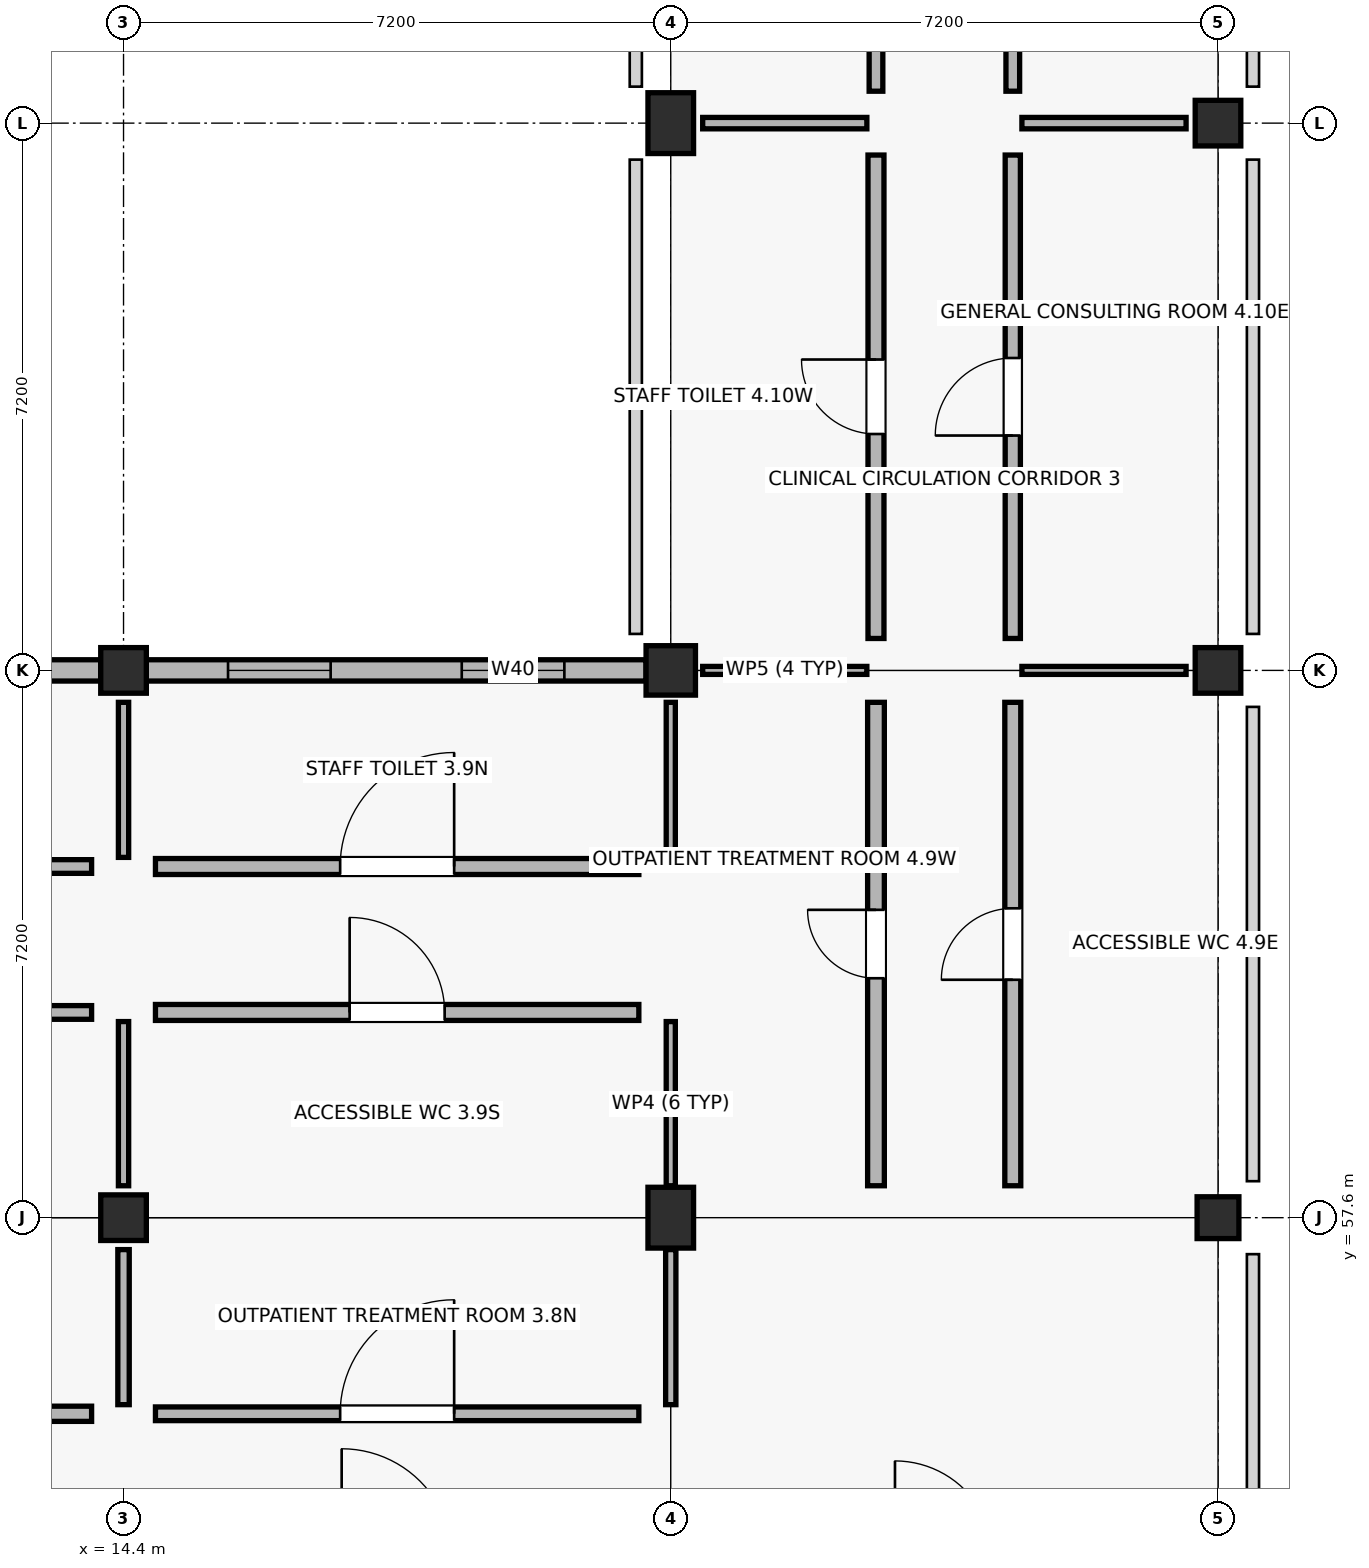
"""IFC4 building model, lengths in metres.
Left out: names, types, materials, properties, quantities, classifications, styles, units other than length and angle.
Written with IfcOpenShell. Run it as: python <this file> out.ifc"""

import sys

from ifc_helpers import new_model, si_unit, direction, frame, frame_2d, origin, origin_2d, place, context, subcontext, project, spatial, rectangle, circle, extrude, element, fill, save


model = new_model("IFC4")
c1 = context("Model", 3, precision=1e-05, world=origin(), true_north=direction((0.0, 1.0)))
c2 = subcontext(c1, "Body", "Model", "MODEL_VIEW")
j1 = project(units=[si_unit("LENGTHUNIT", "METRE"), si_unit("PLANEANGLEUNIT", "RADIAN")], contexts=[c1])
p1 = place(None, origin())
s1 = spatial("IfcSite", under=j1, at=p1, CompositionType="ELEMENT")
p2 = place(p1, origin())
s2 = spatial("IfcBuilding", under=s1, at=p2, CompositionType="ELEMENT")
p3 = place(p2, frame((0.0, 0.0, 4.5)))
s3 = spatial("IfcBuildingStorey", under=s2, at=p3, CompositionType="ELEMENT", Elevation=4.5)
for number, where, z_axis, x_axis in (
    (1, (14.4, 57.6, 0.0), (0.0, 0.0, 1.0), (1.0, 0.0, 0.0)),
    (2, (14.4, 64.8, 0.0), (0.0, 0.0, 1.0), (1.0, 0.0, 0.0)),
):
    element("IfcColumn", number, at=place(p3, frame(where, z_axis=z_axis, x_axis=x_axis)), inside=s3, PredefinedType="COLUMN", context=c2, shape_type="SweptSolid", body=[
        extrude(rectangle(XDim=0.6, YDim=0.6, at=origin_2d()), origin(), (0.0, 0.0, 1.0), 4.5),
    ])
p4 = place(p3, frame((21.6, 57.6, 0.0), z_axis=(0.0, 0.0, 1.0), x_axis=(1.0, 0.0, 0.0)))
e3 = element("IfcColumn", 3, at=p4, inside=s3, PredefinedType="PILASTER", context=c2, shape_type="SweptSolid", body=[
    extrude(rectangle(XDim=0.6, YDim=0.8, at=origin_2d()), origin(), (0.0, 0.0, 1.0), 4.5),
])
p5 = place(p3, frame((21.6, 64.8, 0.0), z_axis=(0.0, 0.0, 1.0), x_axis=(1.0, 0.0, 0.0)))
e4 = element("IfcColumn", 4, at=p5, inside=s3, PredefinedType="COLUMN", context=c2, shape_type="SweptSolid", body=[
    extrude(circle(Radius=0.325, at=origin_2d()), origin(), (0.0, 0.0, 1.0), 4.5),
])
p6 = place(p3, frame((21.6, 72.0, 0.0), z_axis=(0.0, 0.0, 1.0), x_axis=(1.0, 0.0, 0.0)))
e5 = element("IfcColumn", 5, at=p6, inside=s3, PredefinedType="PILASTER", context=c2, shape_type="SweptSolid", body=[
    extrude(rectangle(XDim=0.6, YDim=0.8, at=origin_2d()), origin(), (0.0, 0.0, 1.0), 4.5),
])
p7 = place(p3, frame((28.8, 57.6, 0.0), z_axis=(0.0, 0.0, 1.0), x_axis=(1.0, 0.0, 0.0)))
e6 = element("IfcColumn", 6, at=p7, inside=s3, PredefinedType="COLUMN", context=c2, shape_type="SweptSolid", body=[
    extrude(rectangle(XDim=0.55, YDim=0.55, at=origin_2d()), origin(), (0.0, 0.0, 1.0), 4.5),
])
for number, where, z_axis, x_axis in (
    (7, (28.8, 64.8, 0.0), (0.0, 0.0, 1.0), (1.0, 0.0, 0.0)),
    (8, (28.8, 72.0, 0.0), (0.0, 0.0, 1.0), (1.0, 0.0, 0.0)),
):
    element("IfcColumn", number, at=place(p3, frame(where, z_axis=z_axis, x_axis=x_axis)), inside=s3, PredefinedType="COLUMN", context=c2, shape_type="SweptSolid", body=[
        extrude(rectangle(XDim=0.6, YDim=0.6, at=origin_2d()), origin(), (0.0, 0.0, 1.0), 4.5),
    ])
p8 = place(p3, frame((14.1, 64.8, 0.0), z_axis=(0.0, 0.0, 1.0), x_axis=(-1.0, 0.0, 0.0)))
e9 = element("IfcWall", 9, at=p8, inside=s3, PredefinedType="STANDARD", context=c2, shape_type="SweptSolid", body=[
    extrude(rectangle(XDim=6.55, YDim=0.28, at=frame_2d((3.275, 0.0))), origin(), (0.0, 0.0, 1.0), 3.47),
])
p9 = place(p8, frame((1.225, 0.0, 0.9)))
e10 = element("IfcOpeningElement", 10, at=p9, cuts=e9, PredefinedType="OPENING", context=c2, shape_type="SweptSolid", body=[
    extrude(rectangle(XDim=1.05, YDim=1.62, at=frame_2d((0.525, 0.81))), frame((0.0, 0.15, 0.0), z_axis=(0.0, -1.0, 0.0), x_axis=(1.0, 0.0, 0.0)), (0.0, 0.0, 1.0), 0.3),
])
p10 = place(p8, frame((4.275, 0.0, 0.9)))
e11 = element("IfcOpeningElement", 11, at=p10, cuts=e9, PredefinedType="OPENING", context=c2, shape_type="SweptSolid", body=[
    extrude(rectangle(XDim=1.05, YDim=1.62, at=frame_2d((0.525, 0.81))), frame((0.0, 0.15, 0.0), z_axis=(0.0, -1.0, 0.0), x_axis=(1.0, 0.0, 0.0)), (0.0, 0.0, 1.0), 0.3),
])
p11 = place(p3, frame((21.275, 64.8, 0.0), z_axis=(0.0, 0.0, 1.0), x_axis=(-1.0, 0.0, 0.0)))
e12 = element("IfcWall", 12, at=p11, inside=s3, PredefinedType="STANDARD", context=c2, shape_type="SweptSolid", body=[
    extrude(rectangle(XDim=6.575, YDim=0.28, at=frame_2d((3.288, 0.0))), origin(), (0.0, 0.0, 1.0), 3.47),
])
p12 = place(p11, frame((1.075, 0.0, 0.9)))
e13 = element("IfcOpeningElement", 13, at=p12, cuts=e12, PredefinedType="OPENING", context=c2, shape_type="SweptSolid", body=[
    extrude(rectangle(XDim=1.35, YDim=1.75, at=frame_2d((0.675, 0.875))), frame((0.0, 0.15, 0.0), z_axis=(0.0, -1.0, 0.0), x_axis=(1.0, 0.0, 0.0)), (0.0, 0.0, 1.0), 0.3),
])
p13 = place(p11, frame((4.15, 0.0, 0.9)))
e14 = element("IfcOpeningElement", 14, at=p13, cuts=e12, PredefinedType="OPENING", context=c2, shape_type="SweptSolid", body=[
    extrude(rectangle(XDim=1.35, YDim=1.75, at=frame_2d((0.675, 0.875))), frame((0.0, 0.15, 0.0), z_axis=(0.0, -1.0, 0.0), x_axis=(1.0, 0.0, 0.0)), (0.0, 0.0, 1.0), 0.3),
])
p14 = place(p3, frame((7.62, 55.02, 0.0), z_axis=(0.0, 0.0, 1.0), x_axis=(1.0, 0.0, 0.0)))
e15 = element("IfcWall", 15, at=p14, inside=s3, PredefinedType="SOLIDWALL", context=c2, shape_type="SweptSolid", body=[
    extrude(rectangle(XDim=6.36, YDim=0.2, at=frame_2d((3.18, 0.0))), origin(), (0.0, 0.0, 1.0), 3.36),
])
p15 = place(p14, frame((2.59, 0.0, 0.0)))
e16 = element("IfcOpeningElement", 16, at=p15, cuts=e15, PredefinedType="OPENING", context=c2, shape_type="SweptSolid", body=[
    extrude(rectangle(XDim=1.18, YDim=2.19, at=frame_2d((0.59, 1.095))), frame((0.0, 0.11, 0.0), z_axis=(0.0, -1.0, 0.0), x_axis=(1.0, 0.0, 0.0)), (0.0, 0.0, 1.0), 0.22),
])
p16 = place(p3, frame((14.4, 55.14, 0.0), z_axis=(0.0, 0.0, 1.0), x_axis=(0.0, 1.0, 0.0)))
e17 = element("IfcWall", 17, at=p16, inside=s3, PredefinedType="PARTITIONING", context=c2, shape_type="SweptSolid", body=[
    extrude(rectangle(XDim=2.04, YDim=0.15, at=frame_2d((1.02, 0.0))), origin(), (0.0, 0.0, 1.0), 3.36),
])
p17 = place(p3, frame((7.62, 60.3, 0.0), z_axis=(0.0, 0.0, 1.0), x_axis=(1.0, 0.0, 0.0)))
e18 = element("IfcWall", 18, at=p17, inside=s3, PredefinedType="PARTITIONING", context=c2, shape_type="SweptSolid", body=[
    extrude(rectangle(XDim=6.36, YDim=0.18, at=frame_2d((3.18, 0.0))), origin(), (0.0, 0.0, 1.0), 3.36),
])
p18 = place(p17, frame((2.57, 0.0, 0.0)))
e19 = element("IfcOpeningElement", 19, at=p18, cuts=e18, PredefinedType="OPENING", context=c2, shape_type="SweptSolid", body=[
    extrude(rectangle(XDim=1.22, YDim=2.19, at=frame_2d((0.61, 1.095))), frame((0.0, 0.1, 0.0), z_axis=(0.0, -1.0, 0.0), x_axis=(1.0, 0.0, 0.0)), (0.0, 0.0, 1.0), 0.2),
])
p19 = place(p3, frame((14.4, 58.02, 0.0), z_axis=(0.0, 0.0, 1.0), x_axis=(0.0, 1.0, 0.0)))
e20 = element("IfcWall", 20, at=p19, inside=s3, PredefinedType="PARTITIONING", context=c2, shape_type="SweptSolid", body=[
    extrude(rectangle(XDim=2.16, YDim=0.135, at=frame_2d((1.08, 0.0))), origin(), (0.0, 0.0, 1.0), 3.36),
])
p20 = place(p3, frame((7.62, 62.22, 0.0), z_axis=(0.0, 0.0, 1.0), x_axis=(1.0, 0.0, 0.0)))
e21 = element("IfcWall", 21, at=p20, inside=s3, PredefinedType="PARTITIONING", context=c2, shape_type="SweptSolid", body=[
    extrude(rectangle(XDim=6.36, YDim=0.18, at=frame_2d((3.18, 0.0))), origin(), (0.0, 0.0, 1.0), 3.36),
])
p21 = place(p20, frame((2.55, 0.0, 0.0)))
e22 = element("IfcOpeningElement", 22, at=p21, cuts=e21, PredefinedType="OPENING", context=c2, shape_type="SweptSolid", body=[
    extrude(rectangle(XDim=1.26, YDim=2.19, at=frame_2d((0.63, 1.095))), frame((0.0, 0.1, 0.0), z_axis=(0.0, -1.0, 0.0), x_axis=(1.0, 0.0, 0.0)), (0.0, 0.0, 1.0), 0.2),
])
p22 = place(p3, frame((14.4, 62.34, 0.0), z_axis=(0.0, 0.0, 1.0), x_axis=(0.0, 1.0, 0.0)))
e23 = element("IfcWall", 23, at=p22, inside=s3, PredefinedType="PARTITIONING", context=c2, shape_type="SweptSolid", body=[
    extrude(rectangle(XDim=2.04, YDim=0.135, at=frame_2d((1.02, 0.0))), origin(), (0.0, 0.0, 1.0), 3.36),
])
p23 = place(p3, frame((14.82, 55.02, 0.0), z_axis=(0.0, 0.0, 1.0), x_axis=(1.0, 0.0, 0.0)))
e24 = element("IfcWall", 24, at=p23, inside=s3, PredefinedType="PARTITIONING", context=c2, shape_type="SweptSolid", body=[
    extrude(rectangle(XDim=6.36, YDim=0.18, at=frame_2d((3.18, 0.0))), origin(), (0.0, 0.0, 1.0), 3.36),
])
p24 = place(p23, frame((2.43, 0.0, 0.0)))
e25 = element("IfcOpeningElement", 25, at=p24, cuts=e24, PredefinedType="OPENING", context=c2, shape_type="SweptSolid", body=[
    extrude(rectangle(XDim=1.5, YDim=2.19, at=frame_2d((0.75, 1.095))), frame((0.0, 0.1, 0.0), z_axis=(0.0, -1.0, 0.0), x_axis=(1.0, 0.0, 0.0)), (0.0, 0.0, 1.0), 0.2),
])
p25 = place(p3, frame((21.6, 55.14, 0.0), z_axis=(0.0, 0.0, 1.0), x_axis=(0.0, 1.0, 0.0)))
e26 = element("IfcWall", 26, at=p25, inside=s3, PredefinedType="PARTITIONING", context=c2, shape_type="SweptSolid", body=[
    extrude(rectangle(XDim=2.04, YDim=0.135, at=frame_2d((1.02, 0.0))), origin(), (0.0, 0.0, 1.0), 3.36),
])
p26 = place(p3, frame((14.82, 60.3, 0.0), z_axis=(0.0, 0.0, 1.0), x_axis=(1.0, 0.0, 0.0)))
e27 = element("IfcWall", 27, at=p26, inside=s3, PredefinedType="PLUMBINGWALL", context=c2, shape_type="SweptSolid", body=[
    extrude(rectangle(XDim=6.36, YDim=0.21, at=frame_2d((3.18, 0.0))), origin(), (0.0, 0.0, 1.0), 3.36),
])
p27 = place(p26, frame((2.555, 0.0, 0.0)))
e28 = element("IfcOpeningElement", 28, at=p27, cuts=e27, PredefinedType="OPENING", context=c2, shape_type="SweptSolid", body=[
    extrude(rectangle(XDim=1.25, YDim=2.15, at=frame_2d((0.625, 1.075))), frame((0.0, 0.115, 0.0), z_axis=(0.0, -1.0, 0.0), x_axis=(1.0, 0.0, 0.0)), (0.0, 0.0, 1.0), 0.23),
])
p28 = place(p3, frame((21.6, 58.02, 0.0), z_axis=(0.0, 0.0, 1.0), x_axis=(0.0, 1.0, 0.0)))
e29 = element("IfcWall", 29, at=p28, inside=s3, PredefinedType="PARTITIONING", context=c2, shape_type="SweptSolid", body=[
    extrude(rectangle(XDim=2.16, YDim=0.12, at=frame_2d((1.08, 0.0))), origin(), (0.0, 0.0, 1.0), 3.36),
])
p29 = place(p3, frame((14.82, 62.22, 0.0), z_axis=(0.0, 0.0, 1.0), x_axis=(1.0, 0.0, 0.0)))
e30 = element("IfcWall", 30, at=p29, inside=s3, PredefinedType="PLUMBINGWALL", context=c2, shape_type="SweptSolid", body=[
    extrude(rectangle(XDim=6.36, YDim=0.21, at=frame_2d((3.18, 0.0))), origin(), (0.0, 0.0, 1.0), 3.36),
])
p30 = place(p29, frame((2.43, 0.0, 0.0)))
e31 = element("IfcOpeningElement", 31, at=p30, cuts=e30, PredefinedType="OPENING", context=c2, shape_type="SweptSolid", body=[
    extrude(rectangle(XDim=1.5, YDim=2.2, at=frame_2d((0.75, 1.1))), frame((0.0, 0.115, 0.0), z_axis=(0.0, -1.0, 0.0), x_axis=(1.0, 0.0, 0.0)), (0.0, 0.0, 1.0), 0.23),
])
p31 = place(p3, frame((21.6, 62.34, 0.0), z_axis=(0.0, 0.0, 1.0), x_axis=(0.0, 1.0, 0.0)))
e32 = element("IfcWall", 32, at=p31, inside=s3, PredefinedType="PARTITIONING", context=c2, shape_type="SweptSolid", body=[
    extrude(rectangle(XDim=2.04, YDim=0.12, at=frame_2d((1.02, 0.0))), origin(), (0.0, 0.0, 1.0), 3.36),
])
p32 = place(p3, frame((24.3, 58.02, 0.0), z_axis=(0.0, 0.0, 1.0), x_axis=(0.0, 1.0, 0.0)))
e33 = element("IfcWall", 33, at=p32, inside=s3, PredefinedType="SOLIDWALL", context=c2, shape_type="SweptSolid", body=[
    extrude(rectangle(XDim=6.36, YDim=0.22, at=frame_2d((3.18, 0.0))), origin(), (0.0, 0.0, 1.0), 3.36),
])
p33 = place(p32, frame((2.73, 0.0, 0.0)))
e34 = element("IfcOpeningElement", 34, at=p33, cuts=e33, PredefinedType="OPENING", context=c2, shape_type="SweptSolid", body=[
    extrude(rectangle(XDim=0.9, YDim=2.04, at=frame_2d((0.45, 1.02))), frame((0.0, 0.12, 0.0), z_axis=(0.0, -1.0, 0.0), x_axis=(1.0, 0.0, 0.0)), (0.0, 0.0, 1.0), 0.24),
])
p34 = place(p3, frame((22.02, 64.8, 0.0), z_axis=(0.0, 0.0, 1.0), x_axis=(1.0, 0.0, 0.0)))
e35 = element("IfcWall", 35, at=p34, inside=s3, PredefinedType="PARTITIONING", context=c2, shape_type="SweptSolid", body=[
    extrude(rectangle(XDim=2.16, YDim=0.105, at=frame_2d((1.08, 0.0))), origin(), (0.0, 0.0, 1.0), 3.36),
])
p35 = place(p3, frame((26.1, 58.02, 0.0), z_axis=(0.0, 0.0, 1.0), x_axis=(0.0, 1.0, 0.0)))
e36 = element("IfcWall", 36, at=p35, inside=s3, PredefinedType="PLUMBINGWALL", context=c2, shape_type="SweptSolid", body=[
    extrude(rectangle(XDim=6.36, YDim=0.21, at=frame_2d((3.18, 0.0))), origin(), (0.0, 0.0, 1.0), 3.36),
])
p36 = place(p35, frame((2.71, 0.0, 0.0)))
e37 = element("IfcOpeningElement", 37, at=p36, cuts=e36, PredefinedType="OPENING", context=c2, shape_type="SweptSolid", body=[
    extrude(rectangle(XDim=0.94, YDim=2.04, at=frame_2d((0.47, 1.02))), frame((0.0, 0.115, 0.0), z_axis=(0.0, -1.0, 0.0), x_axis=(1.0, 0.0, 0.0)), (0.0, 0.0, 1.0), 0.23),
])
p37 = place(p3, frame((26.22, 64.8, 0.0), z_axis=(0.0, 0.0, 1.0), x_axis=(1.0, 0.0, 0.0)))
e38 = element("IfcWall", 38, at=p37, inside=s3, PredefinedType="PARTITIONING", context=c2, shape_type="SweptSolid", body=[
    extrude(rectangle(XDim=2.16, YDim=0.105, at=frame_2d((1.08, 0.0))), origin(), (0.0, 0.0, 1.0), 3.36),
])
p38 = place(p3, frame((24.3, 65.22, 0.0), z_axis=(0.0, 0.0, 1.0), x_axis=(0.0, 1.0, 0.0)))
e39 = element("IfcWall", 39, at=p38, inside=s3, PredefinedType="PLUMBINGWALL", context=c2, shape_type="SweptSolid", body=[
    extrude(rectangle(XDim=6.36, YDim=0.21, at=frame_2d((3.18, 0.0))), origin(), (0.0, 0.0, 1.0), 3.36),
])
p39 = place(p38, frame((2.69, 0.0, 0.0)))
e40 = element("IfcOpeningElement", 40, at=p39, cuts=e39, PredefinedType="OPENING", context=c2, shape_type="SweptSolid", body=[
    extrude(rectangle(XDim=0.98, YDim=2.04, at=frame_2d((0.49, 1.02))), frame((0.0, 0.115, 0.0), z_axis=(0.0, -1.0, 0.0), x_axis=(1.0, 0.0, 0.0)), (0.0, 0.0, 1.0), 0.23),
])
p40 = place(p3, frame((22.02, 72.0, 0.0), z_axis=(0.0, 0.0, 1.0), x_axis=(1.0, 0.0, 0.0)))
e41 = element("IfcWall", 41, at=p40, inside=s3, PredefinedType="PARTITIONING", context=c2, shape_type="SweptSolid", body=[
    extrude(rectangle(XDim=2.16, YDim=0.15, at=frame_2d((1.08, 0.0))), origin(), (0.0, 0.0, 1.0), 3.36),
])
p41 = place(p3, frame((26.1, 65.22, 0.0), z_axis=(0.0, 0.0, 1.0), x_axis=(0.0, 1.0, 0.0)))
e42 = element("IfcWall", 42, at=p41, inside=s3, PredefinedType="SOLIDWALL", context=c2, shape_type="SweptSolid", body=[
    extrude(rectangle(XDim=6.36, YDim=0.2, at=frame_2d((3.18, 0.0))), origin(), (0.0, 0.0, 1.0), 3.36),
])
p42 = place(p41, frame((2.67, 0.0, 0.0)))
e43 = element("IfcOpeningElement", 43, at=p42, cuts=e42, PredefinedType="OPENING", context=c2, shape_type="SweptSolid", body=[
    extrude(rectangle(XDim=1.02, YDim=2.04, at=frame_2d((0.51, 1.02))), frame((0.0, 0.11, 0.0), z_axis=(0.0, -1.0, 0.0), x_axis=(1.0, 0.0, 0.0)), (0.0, 0.0, 1.0), 0.22),
])
p43 = place(p3, frame((26.22, 72.0, 0.0), z_axis=(0.0, 0.0, 1.0), x_axis=(1.0, 0.0, 0.0)))
e44 = element("IfcWall", 44, at=p43, inside=s3, PredefinedType="PARTITIONING", context=c2, shape_type="SweptSolid", body=[
    extrude(rectangle(XDim=2.16, YDim=0.15, at=frame_2d((1.08, 0.0))), origin(), (0.0, 0.0, 1.0), 3.36),
])
p44 = place(p3, frame((24.3, 72.42, 0.0), z_axis=(0.0, 0.0, 1.0), x_axis=(0.0, 1.0, 0.0)))
e45 = element("IfcWall", 45, at=p44, inside=s3, PredefinedType="PARTITIONING", context=c2, shape_type="SweptSolid", body=[
    extrude(rectangle(XDim=6.36, YDim=0.18, at=frame_2d((3.18, 0.0))), origin(), (0.0, 0.0, 1.0), 3.36),
])
p45 = place(p44, frame((2.65, 0.0, 0.0)))
e46 = element("IfcOpeningElement", 46, at=p45, cuts=e45, PredefinedType="OPENING", context=c2, shape_type="SweptSolid", body=[
    extrude(rectangle(XDim=1.06, YDim=2.04, at=frame_2d((0.53, 1.02))), frame((0.0, 0.1, 0.0), z_axis=(0.0, -1.0, 0.0), x_axis=(1.0, 0.0, 0.0)), (0.0, 0.0, 1.0), 0.2),
])
p46 = place(p3, frame((26.1, 72.42, 0.0), z_axis=(0.0, 0.0, 1.0), x_axis=(0.0, 1.0, 0.0)))
e47 = element("IfcWall", 47, at=p46, inside=s3, PredefinedType="PARTITIONING", context=c2, shape_type="SweptSolid", body=[
    extrude(rectangle(XDim=6.36, YDim=0.18, at=frame_2d((3.18, 0.0))), origin(), (0.0, 0.0, 1.0), 3.36),
])
p47 = place(p46, frame((2.63, 0.0, 0.0)))
e48 = element("IfcOpeningElement", 48, at=p47, cuts=e47, PredefinedType="OPENING", context=c2, shape_type="SweptSolid", body=[
    extrude(rectangle(XDim=1.1, YDim=2.04, at=frame_2d((0.55, 1.02))), frame((0.0, 0.1, 0.0), z_axis=(0.0, -1.0, 0.0), x_axis=(1.0, 0.0, 0.0)), (0.0, 0.0, 1.0), 0.2),
])
p48 = place(p12, origin())
e49 = element("IfcWindow", 49, at=p48, inside=s3, PartitioningType="SINGLE_PANEL", PredefinedType="WINDOW", context=c2, shape_type="SweptSolid", body=[
    extrude(rectangle(XDim=1.35, YDim=1.75, at=frame_2d((0.675, 0.875))), frame((0.0, 0.03, 0.0), z_axis=(0.0, -1.0, 0.0), x_axis=(1.0, 0.0, 0.0)), (0.0, 0.0, 1.0), 0.06),
])
fill(e13, e49)
p49 = place(p13, origin())
e50 = element("IfcWindow", 50, at=p49, inside=s3, PartitioningType="SINGLE_PANEL", PredefinedType="WINDOW", context=c2, shape_type="SweptSolid", body=[
    extrude(rectangle(XDim=1.35, YDim=1.75, at=frame_2d((0.675, 0.875))), frame((0.0, 0.03, 0.0), z_axis=(0.0, -1.0, 0.0), x_axis=(1.0, 0.0, 0.0)), (0.0, 0.0, 1.0), 0.06),
])
fill(e14, e50)
p50 = place(p24, origin())
e51 = element("IfcDoor", 51, at=p50, inside=s3, OperationType="SINGLE_SWING_RIGHT", PredefinedType="DOOR", context=c2, shape_type="SweptSolid", body=[
    extrude(rectangle(XDim=1.5, YDim=2.19, at=frame_2d((0.75, 1.095))), frame((0.0, 0.025, 0.0), z_axis=(0.0, -1.0, 0.0), x_axis=(1.0, 0.0, 0.0)), (0.0, 0.0, 1.0), 0.05),
])
fill(e25, e51)
p51 = place(p27, origin())
e52 = element("IfcDoor", 52, at=p51, inside=s3, OperationType="SINGLE_SWING_LEFT", PredefinedType="DOOR", context=c2, shape_type="SweptSolid", body=[
    extrude(rectangle(XDim=1.25, YDim=2.15, at=frame_2d((0.625, 1.075))), frame((0.0, 0.025, 0.0), z_axis=(0.0, -1.0, 0.0), x_axis=(1.0, 0.0, 0.0)), (0.0, 0.0, 1.0), 0.05),
])
fill(e28, e52)
p52 = place(p30, origin())
e53 = element("IfcDoor", 53, at=p52, inside=s3, OperationType="SINGLE_SWING_RIGHT", PredefinedType="DOOR", context=c2, shape_type="SweptSolid", body=[
    extrude(rectangle(XDim=1.5, YDim=2.2, at=frame_2d((0.75, 1.1))), frame((0.0, 0.025, 0.0), z_axis=(0.0, -1.0, 0.0), x_axis=(1.0, 0.0, 0.0)), (0.0, 0.0, 1.0), 0.05),
])
fill(e31, e53)
p53 = place(p33, origin())
e54 = element("IfcDoor", 54, at=p53, inside=s3, OperationType="SINGLE_SWING_RIGHT", PredefinedType="DOOR", context=c2, shape_type="SweptSolid", body=[
    extrude(rectangle(XDim=0.9, YDim=2.04, at=frame_2d((0.45, 1.02))), frame((0.0, 0.025, 0.0), z_axis=(0.0, -1.0, 0.0), x_axis=(1.0, 0.0, 0.0)), (0.0, 0.0, 1.0), 0.05),
])
fill(e34, e54)
p54 = place(p36, origin())
e55 = element("IfcDoor", 55, at=p54, inside=s3, OperationType="SINGLE_SWING_LEFT", PredefinedType="DOOR", context=c2, shape_type="SweptSolid", body=[
    extrude(rectangle(XDim=0.94, YDim=2.04, at=frame_2d((0.47, 1.02))), frame((0.0, 0.025, 0.0), z_axis=(0.0, -1.0, 0.0), x_axis=(1.0, 0.0, 0.0)), (0.0, 0.0, 1.0), 0.05),
])
fill(e37, e55)
p55 = place(p39, origin())
e56 = element("IfcDoor", 56, at=p55, inside=s3, OperationType="SINGLE_SWING_RIGHT", PredefinedType="DOOR", context=c2, shape_type="SweptSolid", body=[
    extrude(rectangle(XDim=0.98, YDim=2.04, at=frame_2d((0.49, 1.02))), frame((0.0, 0.025, 0.0), z_axis=(0.0, -1.0, 0.0), x_axis=(1.0, 0.0, 0.0)), (0.0, 0.0, 1.0), 0.05),
])
fill(e40, e56)
p56 = place(p42, origin())
e57 = element("IfcDoor", 57, at=p56, inside=s3, OperationType="SINGLE_SWING_LEFT", PredefinedType="DOOR", context=c2, shape_type="SweptSolid", body=[
    extrude(rectangle(XDim=1.02, YDim=2.04, at=frame_2d((0.51, 1.02))), frame((0.0, 0.025, 0.0), z_axis=(0.0, -1.0, 0.0), x_axis=(1.0, 0.0, 0.0)), (0.0, 0.0, 1.0), 0.05),
])
fill(e43, e57)
save(model, sys.argv[1])
